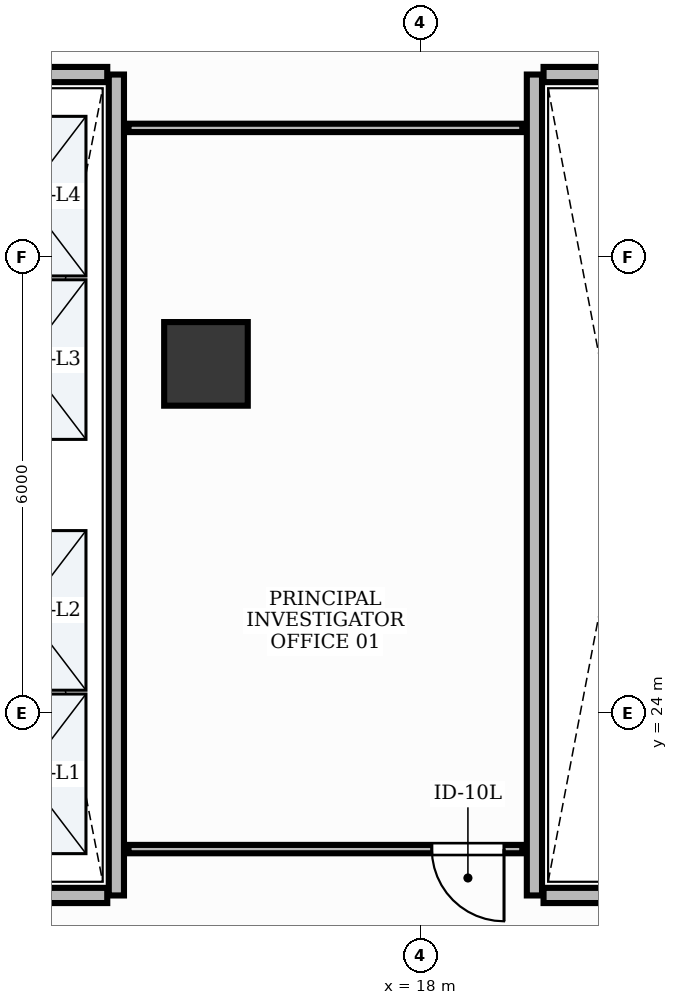
"""IFC4 building model, lengths in metres.
Left out: names, types, materials, properties, quantities, classifications, styles, units other than length and angle.
Written with IfcOpenShell. Run it as: python <this file> out.ifc"""

import sys

from ifc_helpers import new_model, si_unit, direction, frame, frame_2d, origin, origin_2d, place, context, subcontext, project, spatial, rectangle, extrude, element, fill, save


model = new_model("IFC4")
c1 = context("Model", 3, precision=1e-05, world=origin(), true_north=direction((0.0, 1.0)))
c2 = subcontext(c1, "Body", "Model", "MODEL_VIEW")
j1 = project(units=[si_unit("LENGTHUNIT", "METRE"), si_unit("PLANEANGLEUNIT", "RADIAN")], contexts=[c1])
p1 = place(None, origin())
s1 = spatial("IfcSite", under=j1, at=p1, CompositionType="ELEMENT")
p2 = place(p1, origin())
s2 = spatial("IfcBuilding", under=s1, at=p2, CompositionType="ELEMENT")
p3 = place(p2, frame((0.0, 0.0, 38.4)))
s3 = spatial("IfcBuildingStorey", under=s2, at=p3, CompositionType="ELEMENT", Elevation=38.4)
p4 = place(p3, frame((15.179, 28.594, -0.0), z_axis=(0.0, 0.0, 1.0), x_axis=(1.0, 0.0, 0.0)))
e1 = element("IfcColumn", 1, at=p4, inside=s3, PredefinedType="COLUMN", context=c2, shape_type="SweptSolid", body=[
    extrude(rectangle(XDim=1.1, YDim=1.1, at=origin_2d()), origin(), (0.0, 0.0, 1.0), 3.901),
])
p5 = place(p3, frame((14.0, 21.6, 0.0), z_axis=(0.0, 0.0, 1.0), x_axis=(0.0, 1.0, 0.0)))
e2 = element("IfcWall", 2, at=p5, inside=s3, PredefinedType="PARTITIONING", context=c2, shape_type="SweptSolid", body=[
    extrude(rectangle(XDim=10.8, YDim=0.2, at=frame_2d((5.4, 0.0))), origin(), (0.0, 0.0, 1.0), 2.91),
])
for number, where, z_axis, x_axis in (
    (3, (11.72, 21.6, 0.0), (0.0, 0.0, 1.0), (1.0, 0.0, 0.0)),
    (4, (11.72, 32.4, 0.0), (0.0, 0.0, 1.0), (1.0, 0.0, 0.0)),
):
    element("IfcWall", number, at=place(p3, frame(where, z_axis=z_axis, x_axis=x_axis)), inside=s3, PredefinedType="PARTITIONING", context=c2, shape_type="SweptSolid", body=[
        extrude(rectangle(XDim=2.16, YDim=0.2, at=frame_2d((1.08, 0.0))), origin(), (0.0, 0.0, 1.0), 2.91),
    ])
p6 = place(p3, frame((19.5, 21.6, 0.0), z_axis=(0.0, 0.0, 1.0), x_axis=(0.0, 1.0, 0.0)))
e5 = element("IfcWall", 5, at=p6, inside=s3, PredefinedType="PARTITIONING", context=c2, shape_type="SweptSolid", body=[
    extrude(rectangle(XDim=10.8, YDim=0.2, at=frame_2d((5.4, 0.0))), origin(), (0.0, 0.0, 1.0), 2.91),
])
for number, where, z_axis, x_axis in (
    (6, (19.62, 21.6, 0.0), (0.0, 0.0, 1.0), (1.0, 0.0, 0.0)),
    (7, (19.62, 32.4, 0.0), (0.0, 0.0, 1.0), (1.0, 0.0, 0.0)),
):
    element("IfcWall", number, at=place(p3, frame(where, z_axis=z_axis, x_axis=x_axis)), inside=s3, PredefinedType="PARTITIONING", context=c2, shape_type="SweptSolid", body=[
        extrude(rectangle(XDim=2.11, YDim=0.2, at=frame_2d((1.055, 0.0))), origin(), (0.0, 0.0, 1.0), 2.91),
    ])
p7 = place(p3, frame((19.34, 22.21, 0.0), z_axis=(0.0, 0.0, 1.0), x_axis=(-1.0, 0.0, 0.0)))
e8 = element("IfcWall", 8, at=p7, inside=s3, PredefinedType="MOVABLE", context=c2, shape_type="SweptSolid", body=[
    extrude(rectangle(XDim=5.18, YDim=0.11, at=frame_2d((2.59, 0.0))), origin(), (0.0, 0.0, 1.0), 2.91),
])
p8 = place(p7, frame((0.24, 0.0, 0.0)))
e9 = element("IfcOpeningElement", 9, at=p8, cuts=e8, PredefinedType="OPENING", context=c2, shape_type="SweptSolid", body=[
    extrude(rectangle(XDim=0.95, YDim=2.15, at=frame_2d((0.475, 1.075))), frame((0.0, 0.07, 0.0), z_axis=(0.0, -1.0, 0.0), x_axis=(1.0, 0.0, 0.0)), (0.0, 0.0, 1.0), 0.14),
])
p9 = place(p3, frame((14.16, 31.698, 0.0), z_axis=(0.0, 0.0, 1.0), x_axis=(1.0, 0.0, 0.0)))
e10 = element("IfcWall", 10, at=p9, inside=s3, PredefinedType="MOVABLE", context=c2, shape_type="SweptSolid", body=[
    extrude(rectangle(XDim=5.18, YDim=0.11, at=frame_2d((2.59, 0.0))), origin(), (0.0, 0.0, 1.0), 2.91),
])
p10 = place(p8, origin())
e11 = element("IfcDoor", 11, at=p10, inside=s3, OperationType="SINGLE_SWING_LEFT", PredefinedType="DOOR", context=c2, shape_type="SweptSolid", body=[
    extrude(rectangle(XDim=0.95, YDim=2.15, at=frame_2d((0.475, 1.075))), frame((0.0, 0.025, 0.0), z_axis=(0.0, -1.0, 0.0), x_axis=(1.0, 0.0, 0.0)), (0.0, 0.0, 1.0), 0.05),
])
fill(e9, e11)
save(model, sys.argv[1])
